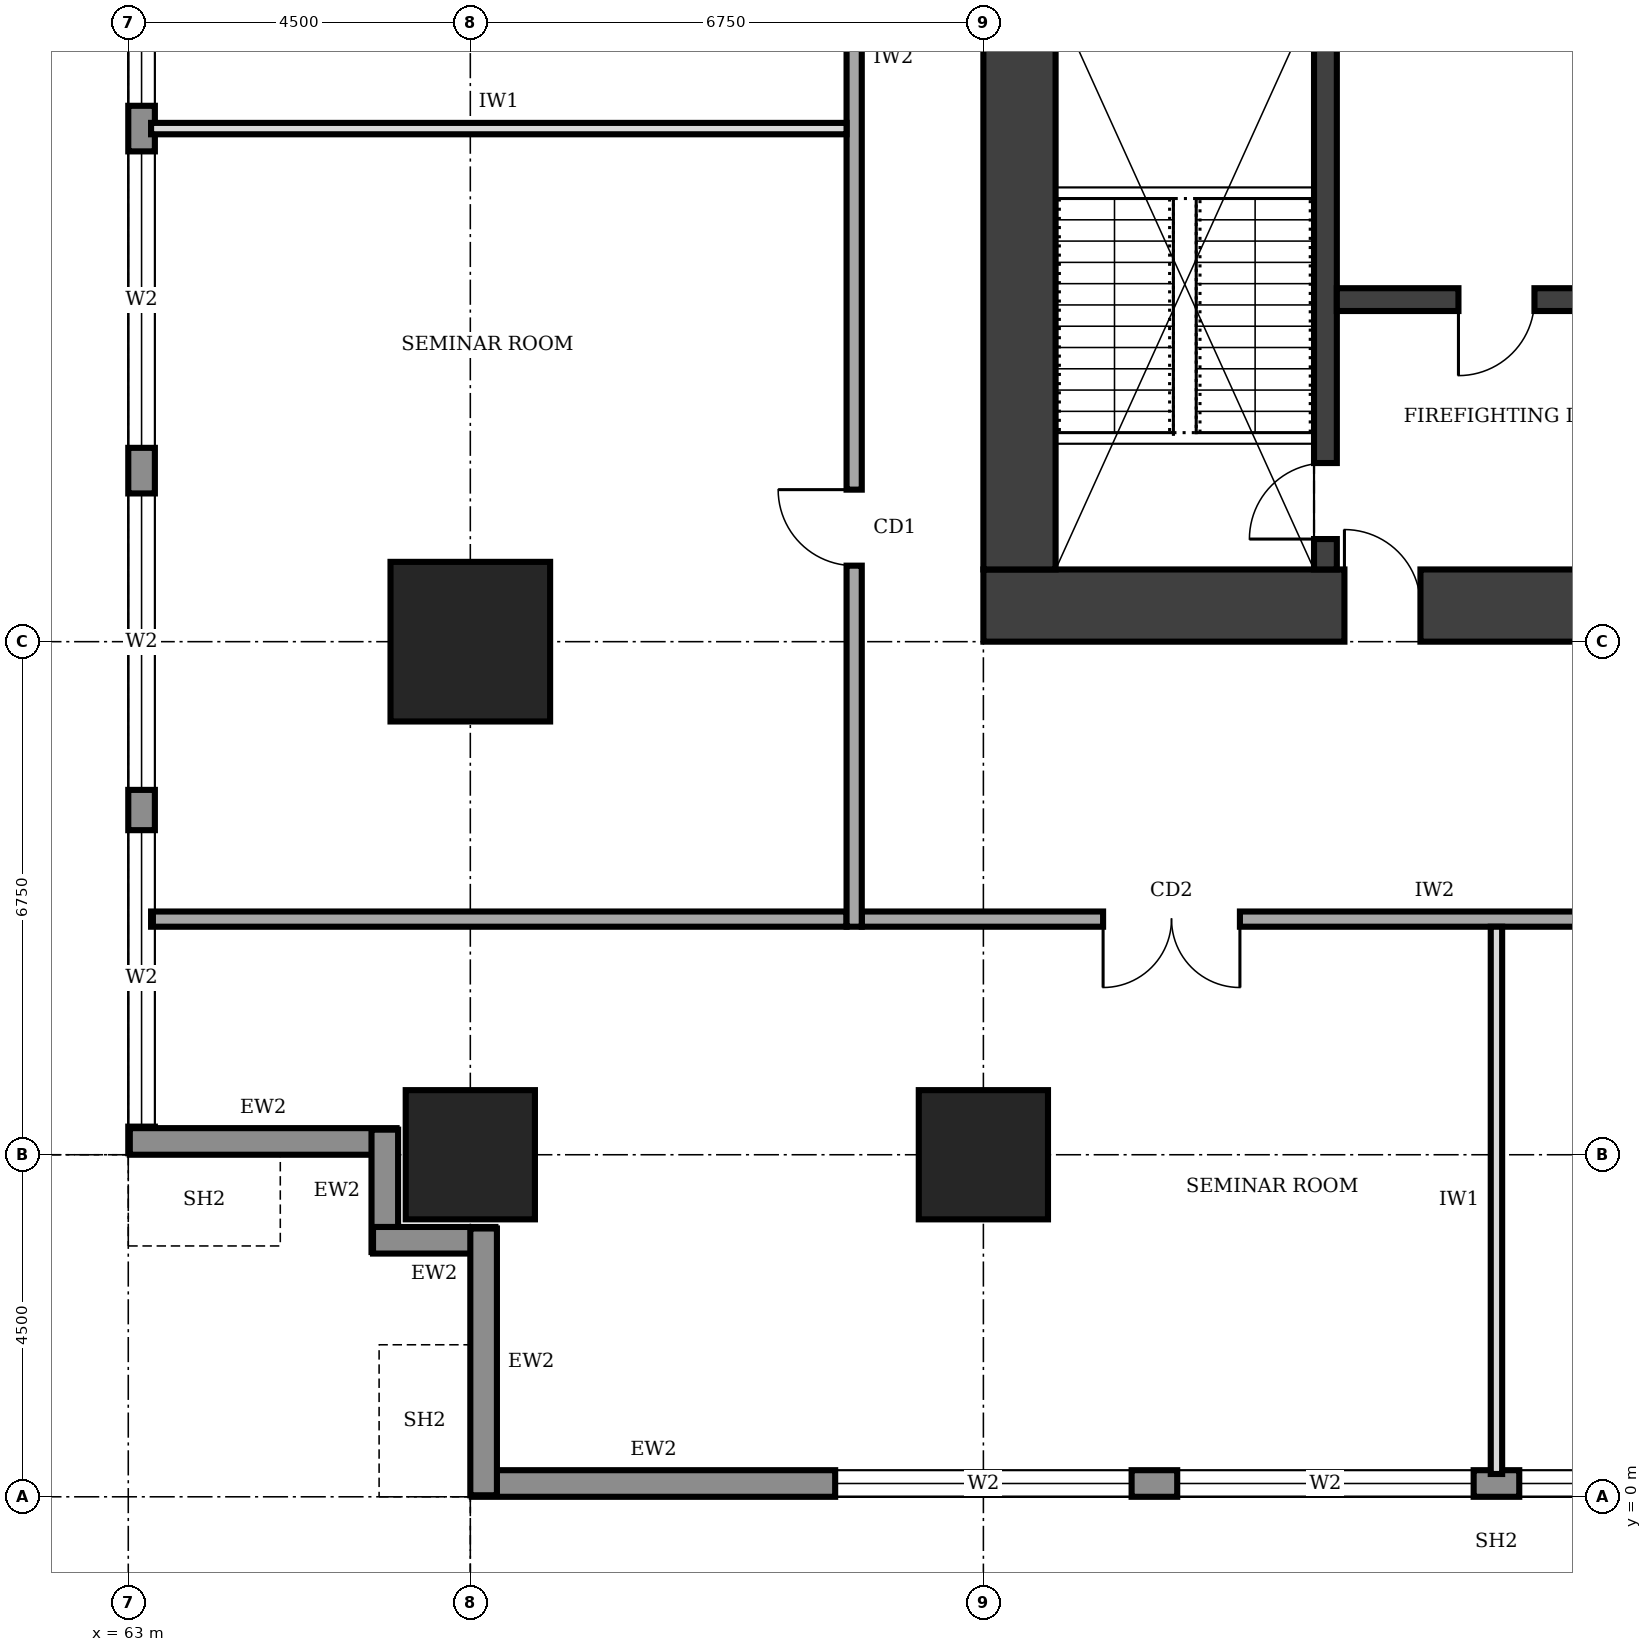
"""IFC4 building model, lengths in metres.
Left out: names, types, materials, properties, quantities, classifications, styles, units other than length and angle.
Written with IfcOpenShell. Run it as: python <this file> out.ifc"""

import sys

from ifc_helpers import new_model, si_unit, direction, frame, frame_2d, origin, origin_2d, place, context, subcontext, project, spatial, rectangle, extrude, element, fill, save


model = new_model("IFC4")
c1 = context("Model", 3, precision=1e-05, world=origin(), true_north=direction((0.0, 1.0)))
c2 = subcontext(c1, "Body", "Model", "MODEL_VIEW")
j1 = project(units=[si_unit("LENGTHUNIT", "METRE"), si_unit("PLANEANGLEUNIT", "RADIAN")], contexts=[c1])
p1 = place(None, origin())
s1 = spatial("IfcSite", under=j1, at=p1, CompositionType="ELEMENT")
p2 = place(p1, origin())
s2 = spatial("IfcBuilding", under=s1, at=p2, CompositionType="ELEMENT")
p3 = place(p2, frame((0.0, 0.0, 69.0)))
s3 = spatial("IfcBuildingStorey", under=s2, at=p3, CompositionType="ELEMENT", Elevation=69.0)
p4 = place(p3, frame((74.25, 11.725, 0.0), z_axis=(0.0, 0.0, 1.0), x_axis=(1.0, 0.0, 0.0)))
e1 = element("IfcWall", 1, at=p4, inside=s3, PredefinedType="SHEAR", context=c2, shape_type="SweptSolid", body=[
    extrude(rectangle(XDim=13.5, YDim=0.95, at=frame_2d((6.75, 0.0))), origin(), (0.0, 0.0, 1.0), 4.0),
])
p5 = place(p4, frame((4.75, 0.0, 0.0)))
e2 = element("IfcOpeningElement", 2, at=p5, cuts=e1, PredefinedType="OPENING", context=c2, shape_type="SweptSolid", body=[
    extrude(rectangle(XDim=1.0, YDim=2.1, at=frame_2d((0.5, 1.05))), frame((0.0, 0.485, 0.0), z_axis=(0.0, -1.0, 0.0), x_axis=(1.0, 0.0, 0.0)), (0.0, 0.0, 1.0), 0.97),
])
p6 = place(p3, frame((74.725, 28.3, 0.0), z_axis=(0.0, 0.0, 1.0), x_axis=(0.0, -1.0, 0.0)))
e3 = element("IfcWall", 3, at=p6, inside=s3, PredefinedType="SHEAR", context=c2, shape_type="SweptSolid", body=[
    extrude(rectangle(XDim=16.1, YDim=0.95, at=frame_2d((8.05, 0.0))), origin(), (0.0, 0.0, 1.0), 4.0),
])
p7 = place(p3, frame((78.75, 12.2, 0.0), z_axis=(0.0, 0.0, 1.0), x_axis=(0.0, 1.0, 0.0)))
e4 = element("IfcWall", 4, at=p7, inside=s3, PredefinedType="SHEAR", context=c2, shape_type="SweptSolid", body=[
    extrude(rectangle(XDim=16.1, YDim=0.3, at=frame_2d((8.05, 0.0))), origin(), (0.0, 0.0, 1.0), 4.0),
])
p8 = place(p7, frame((0.4, 0.0, 0.0)))
e5 = element("IfcOpeningElement", 5, at=p8, cuts=e4, PredefinedType="OPENING", context=c2, shape_type="SweptSolid", body=[
    extrude(rectangle(XDim=1.0, YDim=2.1, at=frame_2d((0.5, 1.05))), frame((0.0, 0.16, 0.0), z_axis=(0.0, -1.0, 0.0), x_axis=(1.0, 0.0, 0.0)), (0.0, 0.0, 1.0), 0.32),
])
p9 = place(p7, frame((9.0, 0.0, 0.0)))
e6 = element("IfcOpeningElement", 6, at=p9, cuts=e4, PredefinedType="OPENING", context=c2, shape_type="SweptSolid", body=[
    extrude(rectangle(XDim=1.1, YDim=2.1, at=frame_2d((0.55, 1.05))), frame((0.0, 0.16, 0.0), z_axis=(0.0, -1.0, 0.0), x_axis=(1.0, 0.0, 0.0)), (0.0, 0.0, 1.0), 0.32),
])
p10 = place(p7, frame((12.0, 0.0, 0.0)))
e7 = element("IfcOpeningElement", 7, at=p10, cuts=e4, PredefinedType="OPENING", context=c2, shape_type="SweptSolid", body=[
    extrude(rectangle(XDim=1.1, YDim=2.1, at=frame_2d((0.55, 1.05))), frame((0.0, 0.16, 0.0), z_axis=(0.0, -1.0, 0.0), x_axis=(1.0, 0.0, 0.0)), (0.0, 0.0, 1.0), 0.32),
])
p11 = place(p3, frame((78.9, 15.75, 0.0), z_axis=(0.0, 0.0, 1.0), x_axis=(1.0, 0.0, 0.0)))
e8 = element("IfcWall", 8, at=p11, inside=s3, PredefinedType="SHEAR", context=c2, shape_type="SweptSolid", body=[
    extrude(rectangle(XDim=4.2, YDim=0.3, at=frame_2d((2.1, 0.0))), origin(), (0.0, 0.0, 1.0), 4.0),
])
p12 = place(p11, frame((1.6, 0.0, 0.0)))
e9 = element("IfcOpeningElement", 9, at=p12, cuts=e8, PredefinedType="OPENING", context=c2, shape_type="SweptSolid", body=[
    extrude(rectangle(XDim=1.0, YDim=2.1, at=frame_2d((0.5, 1.05))), frame((0.0, 0.16, 0.0), z_axis=(0.0, -1.0, 0.0), x_axis=(1.0, 0.0, 0.0)), (0.0, 0.0, 1.0), 0.32),
])
for number, where, z_axis, x_axis in (
    (10, (67.5, 4.5, 0.0), (0.0, 0.0, 1.0), (1.0, 0.0, 0.0)),
    (11, (74.25, 4.5, 0.0), (0.0, 0.0, 1.0), (1.0, 0.0, 0.0)),
):
    element("IfcColumn", number, at=place(p3, frame(where, z_axis=z_axis, x_axis=x_axis)), inside=s3, PredefinedType="COLUMN", context=c2, shape_type="SweptSolid", body=[
        extrude(rectangle(XDim=1.7, YDim=1.7, at=origin_2d()), origin(), (0.0, 0.0, 1.0), 4.0),
    ])
p13 = place(p3, frame((67.5, 11.25, 0.0), z_axis=(0.0, 0.0, 1.0), x_axis=(1.0, 0.0, 0.0)))
e12 = element("IfcColumn", 12, at=p13, inside=s3, PredefinedType="COLUMN", context=c2, shape_type="SweptSolid", body=[
    extrude(rectangle(XDim=2.1, YDim=2.1, at=origin_2d()), origin(), (0.0, 0.0, 1.0), 4.0),
])
p14 = place(p3, frame((67.52, 0.175, 0.0), z_axis=(0.0, 0.0, 1.0), x_axis=(1.0, 0.0, 0.0)))
e13 = element("IfcWall", 13, at=p14, inside=s3, PredefinedType="STANDARD", context=c2, shape_type="SweptSolid", body=[
    extrude(rectangle(XDim=26.96, YDim=0.35, at=frame_2d((13.48, 0.0))), origin(), (0.0, 0.0, 1.0), 3.75),
])
p15 = place(p14, frame((4.78, 0.0, 0.6)))
e14 = element("IfcOpeningElement", 14, at=p15, cuts=e13, PredefinedType="OPENING", context=c2, shape_type="SweptSolid", body=[
    extrude(rectangle(XDim=3.9, YDim=2.6, at=frame_2d((1.95, 1.3))), frame((0.0, 0.185, 0.0), z_axis=(0.0, -1.0, 0.0), x_axis=(1.0, 0.0, 0.0)), (0.0, 0.0, 1.0), 0.37),
])
p16 = place(p14, frame((9.28, 0.0, 0.6)))
e15 = element("IfcOpeningElement", 15, at=p16, cuts=e13, PredefinedType="OPENING", context=c2, shape_type="SweptSolid", body=[
    extrude(rectangle(XDim=3.9, YDim=2.6, at=frame_2d((1.95, 1.3))), frame((0.0, 0.185, 0.0), z_axis=(0.0, -1.0, 0.0), x_axis=(1.0, 0.0, 0.0)), (0.0, 0.0, 1.0), 0.37),
])
p17 = place(p14, frame((13.78, 0.0, 0.6)))
e16 = element("IfcOpeningElement", 16, at=p17, cuts=e13, PredefinedType="OPENING", context=c2, shape_type="SweptSolid", body=[
    extrude(rectangle(XDim=3.9, YDim=2.6, at=frame_2d((1.95, 1.3))), frame((0.0, 0.185, 0.0), z_axis=(0.0, -1.0, 0.0), x_axis=(1.0, 0.0, 0.0)), (0.0, 0.0, 1.0), 0.37),
])
p18 = place(p14, frame((18.28, 0.0, 0.6)))
e17 = element("IfcOpeningElement", 17, at=p18, cuts=e13, PredefinedType="OPENING", context=c2, shape_type="SweptSolid", body=[
    extrude(rectangle(XDim=3.9, YDim=2.6, at=frame_2d((1.95, 1.3))), frame((0.0, 0.185, 0.0), z_axis=(0.0, -1.0, 0.0), x_axis=(1.0, 0.0, 0.0)), (0.0, 0.0, 1.0), 0.37),
])
p19 = place(p14, frame((22.71, 0.0, 0.6)))
e18 = element("IfcOpeningElement", 18, at=p19, cuts=e13, PredefinedType="OPENING", context=c2, shape_type="SweptSolid", body=[
    extrude(rectangle(XDim=3.9, YDim=2.6, at=frame_2d((1.95, 1.3))), frame((0.0, 0.185, 0.0), z_axis=(0.0, -1.0, 0.0), x_axis=(1.0, 0.0, 0.0)), (0.0, 0.0, 1.0), 0.37),
])
p20 = place(p3, frame((63.175, 35.98, 0.0), z_axis=(0.0, 0.0, 1.0), x_axis=(0.0, -1.0, 0.0)))
e19 = element("IfcWall", 19, at=p20, inside=s3, PredefinedType="STANDARD", context=c2, shape_type="SweptSolid", body=[
    extrude(rectangle(XDim=31.46, YDim=0.35, at=frame_2d((15.73, 0.0))), origin(), (0.0, 0.0, 1.0), 3.75),
])
p21 = place(p20, frame((27.21, 0.0, 0.6)))
e20 = element("IfcOpeningElement", 20, at=p21, cuts=e19, PredefinedType="OPENING", context=c2, shape_type="SweptSolid", body=[
    extrude(rectangle(XDim=3.9, YDim=2.6, at=frame_2d((1.95, 1.3))), frame((0.0, 0.185, 0.0), z_axis=(0.0, -1.0, 0.0), x_axis=(1.0, 0.0, 0.0)), (0.0, 0.0, 1.0), 0.37),
])
p22 = place(p20, frame((22.78, 0.0, 0.6)))
e21 = element("IfcOpeningElement", 21, at=p22, cuts=e19, PredefinedType="OPENING", context=c2, shape_type="SweptSolid", body=[
    extrude(rectangle(XDim=3.9, YDim=2.6, at=frame_2d((1.95, 1.3))), frame((0.0, 0.185, 0.0), z_axis=(0.0, -1.0, 0.0), x_axis=(1.0, 0.0, 0.0)), (0.0, 0.0, 1.0), 0.37),
])
p23 = place(p20, frame((18.28, 0.0, 0.6)))
e22 = element("IfcOpeningElement", 22, at=p23, cuts=e19, PredefinedType="OPENING", context=c2, shape_type="SweptSolid", body=[
    extrude(rectangle(XDim=3.9, YDim=2.6, at=frame_2d((1.95, 1.3))), frame((0.0, 0.185, 0.0), z_axis=(0.0, -1.0, 0.0), x_axis=(1.0, 0.0, 0.0)), (0.0, 0.0, 1.0), 0.37),
])
p24 = place(p20, frame((13.78, 0.0, 0.6)))
e23 = element("IfcOpeningElement", 23, at=p24, cuts=e19, PredefinedType="OPENING", context=c2, shape_type="SweptSolid", body=[
    extrude(rectangle(XDim=3.9, YDim=2.6, at=frame_2d((1.95, 1.3))), frame((0.0, 0.185, 0.0), z_axis=(0.0, -1.0, 0.0), x_axis=(1.0, 0.0, 0.0)), (0.0, 0.0, 1.0), 0.37),
])
p25 = place(p20, frame((9.28, 0.0, 0.6)))
e24 = element("IfcOpeningElement", 24, at=p25, cuts=e19, PredefinedType="OPENING", context=c2, shape_type="SweptSolid", body=[
    extrude(rectangle(XDim=3.9, YDim=2.6, at=frame_2d((1.95, 1.3))), frame((0.0, 0.185, 0.0), z_axis=(0.0, -1.0, 0.0), x_axis=(1.0, 0.0, 0.0)), (0.0, 0.0, 1.0), 0.37),
])
p26 = place(p20, frame((4.78, 0.0, 0.6)))
e25 = element("IfcOpeningElement", 25, at=p26, cuts=e19, PredefinedType="OPENING", context=c2, shape_type="SweptSolid", body=[
    extrude(rectangle(XDim=3.9, YDim=2.6, at=frame_2d((1.95, 1.3))), frame((0.0, 0.185, 0.0), z_axis=(0.0, -1.0, 0.0), x_axis=(1.0, 0.0, 0.0)), (0.0, 0.0, 1.0), 0.37),
])
p27 = place(p3, frame((63.02, 4.675, 0.0), z_axis=(0.0, 0.0, 1.0), x_axis=(1.0, 0.0, 0.0)))
e26 = element("IfcWall", 26, at=p27, inside=s3, PredefinedType="STANDARD", context=c2, shape_type="SweptSolid", body=[
    extrude(rectangle(XDim=3.51, YDim=0.35, at=frame_2d((1.755, 0.0))), origin(), (0.0, 0.0, 1.0), 2.85),
])
for number, where, z_axis, x_axis in (
    (27, (66.375, 4.83, 0.0), (0.0, 0.0, 1.0), (0.0, -1.0, 0.0)),
    (28, (66.22, 3.375, 0.0), (0.0, 0.0, 1.0), (1.0, 0.0, 0.0)),
):
    element("IfcWall", number, at=place(p3, frame(where, z_axis=z_axis, x_axis=x_axis)), inside=s3, PredefinedType="STANDARD", context=c2, shape_type="SweptSolid", body=[
        extrude(rectangle(XDim=1.61, YDim=0.35, at=frame_2d((0.805, 0.0))), origin(), (0.0, 0.0, 1.0), 3.75),
    ])
p28 = place(p3, frame((67.675, 3.53, 0.0), z_axis=(0.0, 0.0, 1.0), x_axis=(0.0, -1.0, 0.0)))
e29 = element("IfcWall", 29, at=p28, inside=s3, PredefinedType="STANDARD", context=c2, shape_type="SweptSolid", body=[
    extrude(rectangle(XDim=3.51, YDim=0.35, at=frame_2d((1.755, 0.0))), origin(), (0.0, 0.0, 1.0), 2.85),
])
p29 = place(p3, frame((72.65, 7.6, 0.0), z_axis=(0.0, 0.0, 1.0), x_axis=(1.0, 0.0, 0.0)))
e30 = element("IfcWall", 30, at=p29, inside=s3, PredefinedType="SOLIDWALL", context=c2, shape_type="SweptSolid", body=[
    extrude(rectangle(XDim=16.9, YDim=0.2, at=frame_2d((8.45, 0.0))), origin(), (0.0, 0.0, 1.0), 3.75),
])
p30 = place(p29, frame((3.175, 0.0, 0.0)))
e31 = element("IfcOpeningElement", 31, at=p30, cuts=e30, PredefinedType="OPENING", context=c2, shape_type="SweptSolid", body=[
    extrude(rectangle(XDim=1.8, YDim=2.1, at=frame_2d((0.9, 1.05))), frame((0.0, 0.11, 0.0), z_axis=(0.0, -1.0, 0.0), x_axis=(1.0, 0.0, 0.0)), (0.0, 0.0, 1.0), 0.22),
])
p31 = place(p29, frame((10.1, 0.0, 0.0)))
e32 = element("IfcOpeningElement", 32, at=p31, cuts=e30, PredefinedType="OPENING", context=c2, shape_type="SweptSolid", body=[
    extrude(rectangle(XDim=1.0, YDim=2.1, at=frame_2d((0.5, 1.05))), frame((0.0, 0.11, 0.0), z_axis=(0.0, -1.0, 0.0), x_axis=(1.0, 0.0, 0.0)), (0.0, 0.0, 1.0), 0.22),
])
p32 = place(p29, frame((14.375, 0.0, 0.0)))
e33 = element("IfcOpeningElement", 33, at=p32, cuts=e30, PredefinedType="OPENING", context=c2, shape_type="SweptSolid", body=[
    extrude(rectangle(XDim=1.0, YDim=2.1, at=frame_2d((0.5, 1.05))), frame((0.0, 0.11, 0.0), z_axis=(0.0, -1.0, 0.0), x_axis=(1.0, 0.0, 0.0)), (0.0, 0.0, 1.0), 0.22),
])
p33 = place(p3, frame((72.55, 32.8, 0.0), z_axis=(0.0, 0.0, 1.0), x_axis=(0.0, -1.0, 0.0)))
e34 = element("IfcWall", 34, at=p33, inside=s3, PredefinedType="SOLIDWALL", context=c2, shape_type="SweptSolid", body=[
    extrude(rectangle(XDim=25.3, YDim=0.2, at=frame_2d((12.65, 0.0))), origin(), (0.0, 0.0, 1.0), 3.75),
])
p34 = place(p33, frame((19.55, 0.0, 0.0)))
e35 = element("IfcOpeningElement", 35, at=p34, cuts=e34, PredefinedType="OPENING", context=c2, shape_type="SweptSolid", body=[
    extrude(rectangle(XDim=1.0, YDim=2.1, at=frame_2d((0.5, 1.05))), frame((0.0, 0.11, 0.0), z_axis=(0.0, -1.0, 0.0), x_axis=(1.0, 0.0, 0.0)), (0.0, 0.0, 1.0), 0.22),
])
p35 = place(p33, frame((6.4, 0.0, 0.0)))
e36 = element("IfcOpeningElement", 36, at=p35, cuts=e34, PredefinedType="OPENING", context=c2, shape_type="SweptSolid", body=[
    extrude(rectangle(XDim=1.8, YDim=2.1, at=frame_2d((0.9, 1.05))), frame((0.0, 0.11, 0.0), z_axis=(0.0, -1.0, 0.0), x_axis=(1.0, 0.0, 0.0)), (0.0, 0.0, 1.0), 0.22),
])
p36 = place(p3, frame((63.3, 7.6, 0.0), z_axis=(0.0, 0.0, 1.0), x_axis=(1.0, 0.0, 0.0)))
e37 = element("IfcWall", 37, at=p36, inside=s3, PredefinedType="SOLIDWALL", context=c2, shape_type="SweptSolid", body=[
    extrude(rectangle(XDim=9.15, YDim=0.2, at=frame_2d((4.575, 0.0))), origin(), (0.0, 0.0, 1.0), 3.75),
])
p37 = place(p3, frame((81.0, 0.3, 0.0), z_axis=(0.0, 0.0, 1.0), x_axis=(0.0, 1.0, 0.0)))
e38 = element("IfcWall", 38, at=p37, inside=s3, PredefinedType="PARTITIONING", context=c2, shape_type="SweptSolid", body=[
    extrude(rectangle(XDim=7.2, YDim=0.15, at=frame_2d((3.6, 0.0))), origin(), (0.0, 0.0, 1.0), 3.75),
])
p38 = place(p3, frame((63.3, 18.0, 0.0), z_axis=(0.0, 0.0, 1.0), x_axis=(1.0, 0.0, 0.0)))
e39 = element("IfcWall", 39, at=p38, inside=s3, PredefinedType="PARTITIONING", context=c2, shape_type="SweptSolid", body=[
    extrude(rectangle(XDim=9.15, YDim=0.15, at=frame_2d((4.575, 0.0))), origin(), (0.0, 0.0, 1.0), 3.75),
])
p39 = place(p15, origin())
e40 = element("IfcWindow", 40, at=p39, inside=s3, PartitioningType="SINGLE_PANEL", PredefinedType="WINDOW", context=c2, shape_type="SweptSolid", body=[
    extrude(rectangle(XDim=3.9, YDim=2.6, at=frame_2d((1.95, 1.3))), frame((0.0, 0.03, 0.0), z_axis=(0.0, -1.0, 0.0), x_axis=(1.0, 0.0, 0.0)), (0.0, 0.0, 1.0), 0.06),
])
fill(e14, e40)
p40 = place(p16, origin())
e41 = element("IfcWindow", 41, at=p40, inside=s3, PartitioningType="SINGLE_PANEL", PredefinedType="WINDOW", context=c2, shape_type="SweptSolid", body=[
    extrude(rectangle(XDim=3.9, YDim=2.6, at=frame_2d((1.95, 1.3))), frame((0.0, 0.03, 0.0), z_axis=(0.0, -1.0, 0.0), x_axis=(1.0, 0.0, 0.0)), (0.0, 0.0, 1.0), 0.06),
])
fill(e15, e41)
p41 = place(p17, origin())
e42 = element("IfcWindow", 42, at=p41, inside=s3, PartitioningType="SINGLE_PANEL", PredefinedType="WINDOW", context=c2, shape_type="SweptSolid", body=[
    extrude(rectangle(XDim=3.9, YDim=2.6, at=frame_2d((1.95, 1.3))), frame((0.0, 0.03, 0.0), z_axis=(0.0, -1.0, 0.0), x_axis=(1.0, 0.0, 0.0)), (0.0, 0.0, 1.0), 0.06),
])
fill(e16, e42)
p42 = place(p21, origin())
e43 = element("IfcWindow", 43, at=p42, inside=s3, PartitioningType="SINGLE_PANEL", PredefinedType="WINDOW", context=c2, shape_type="SweptSolid", body=[
    extrude(rectangle(XDim=3.9, YDim=2.6, at=frame_2d((1.95, 1.3))), frame((0.0, 0.03, 0.0), z_axis=(0.0, -1.0, 0.0), x_axis=(1.0, 0.0, 0.0)), (0.0, 0.0, 1.0), 0.06),
])
fill(e20, e43)
p43 = place(p22, origin())
e44 = element("IfcWindow", 44, at=p43, inside=s3, PartitioningType="SINGLE_PANEL", PredefinedType="WINDOW", context=c2, shape_type="SweptSolid", body=[
    extrude(rectangle(XDim=3.9, YDim=2.6, at=frame_2d((1.95, 1.3))), frame((0.0, 0.03, 0.0), z_axis=(0.0, -1.0, 0.0), x_axis=(1.0, 0.0, 0.0)), (0.0, 0.0, 1.0), 0.06),
])
fill(e21, e44)
p44 = place(p23, origin())
e45 = element("IfcWindow", 45, at=p44, inside=s3, PartitioningType="SINGLE_PANEL", PredefinedType="WINDOW", context=c2, shape_type="SweptSolid", body=[
    extrude(rectangle(XDim=3.9, YDim=2.6, at=frame_2d((1.95, 1.3))), frame((0.0, 0.03, 0.0), z_axis=(0.0, -1.0, 0.0), x_axis=(1.0, 0.0, 0.0)), (0.0, 0.0, 1.0), 0.06),
])
fill(e22, e45)
p45 = place(p24, origin())
e46 = element("IfcWindow", 46, at=p45, inside=s3, PartitioningType="SINGLE_PANEL", PredefinedType="WINDOW", context=c2, shape_type="SweptSolid", body=[
    extrude(rectangle(XDim=3.9, YDim=2.6, at=frame_2d((1.95, 1.3))), frame((0.0, 0.03, 0.0), z_axis=(0.0, -1.0, 0.0), x_axis=(1.0, 0.0, 0.0)), (0.0, 0.0, 1.0), 0.06),
])
fill(e23, e46)
p46 = place(p5, origin())
e47 = element("IfcDoor", 47, at=p46, inside=s3, OperationType="SINGLE_SWING_LEFT", PredefinedType="DOOR", context=c2, shape_type="SweptSolid", body=[
    extrude(rectangle(XDim=1.0, YDim=2.1, at=frame_2d((0.5, 1.05))), frame((0.0, 0.025, 0.0), z_axis=(0.0, -1.0, 0.0), x_axis=(1.0, 0.0, 0.0)), (0.0, 0.0, 1.0), 0.05),
])
fill(e2, e47)
p47 = place(p12, frame((1.0, 0.0, 0.0), z_axis=(0.0, 0.0, 1.0), x_axis=(-1.0, 0.0, 0.0)))
e48 = element("IfcDoor", 48, at=p47, inside=s3, OperationType="SINGLE_SWING_RIGHT", PredefinedType="DOOR", context=c2, shape_type="SweptSolid", body=[
    extrude(rectangle(XDim=1.0, YDim=2.1, at=frame_2d((0.5, 1.05))), frame((0.0, 0.025, 0.0), z_axis=(0.0, -1.0, 0.0), x_axis=(1.0, 0.0, 0.0)), (0.0, 0.0, 1.0), 0.05),
])
fill(e9, e48)
p48 = place(p8, origin())
e49 = element("IfcDoor", 49, at=p48, inside=s3, OperationType="SINGLE_SWING_LEFT", PredefinedType="DOOR", context=c2, shape_type="SweptSolid", body=[
    extrude(rectangle(XDim=1.0, YDim=2.1, at=frame_2d((0.5, 1.05))), frame((0.0, 0.025, 0.0), z_axis=(0.0, -1.0, 0.0), x_axis=(1.0, 0.0, 0.0)), (0.0, 0.0, 1.0), 0.05),
])
fill(e5, e49)
p49 = place(p30, frame((1.8, 0.0, 0.0), z_axis=(0.0, 0.0, 1.0), x_axis=(-1.0, 0.0, 0.0)))
e50 = element("IfcDoor", 50, at=p49, inside=s3, OperationType="DOUBLE_DOOR_SINGLE_SWING", PredefinedType="DOOR", context=c2, shape_type="SweptSolid", body=[
    extrude(rectangle(XDim=1.8, YDim=2.1, at=frame_2d((0.9, 1.05))), frame((0.0, 0.025, 0.0), z_axis=(0.0, -1.0, 0.0), x_axis=(1.0, 0.0, 0.0)), (0.0, 0.0, 1.0), 0.05),
])
fill(e31, e50)
p50 = place(p34, frame((1.0, 0.0, 0.0), z_axis=(0.0, 0.0, 1.0), x_axis=(-1.0, 0.0, 0.0)))
e51 = element("IfcDoor", 51, at=p50, inside=s3, OperationType="SINGLE_SWING_RIGHT", PredefinedType="DOOR", context=c2, shape_type="SweptSolid", body=[
    extrude(rectangle(XDim=1.0, YDim=2.1, at=frame_2d((0.5, 1.05))), frame((0.0, 0.025, 0.0), z_axis=(0.0, -1.0, 0.0), x_axis=(1.0, 0.0, 0.0)), (0.0, 0.0, 1.0), 0.05),
])
fill(e35, e51)
save(model, sys.argv[1])
